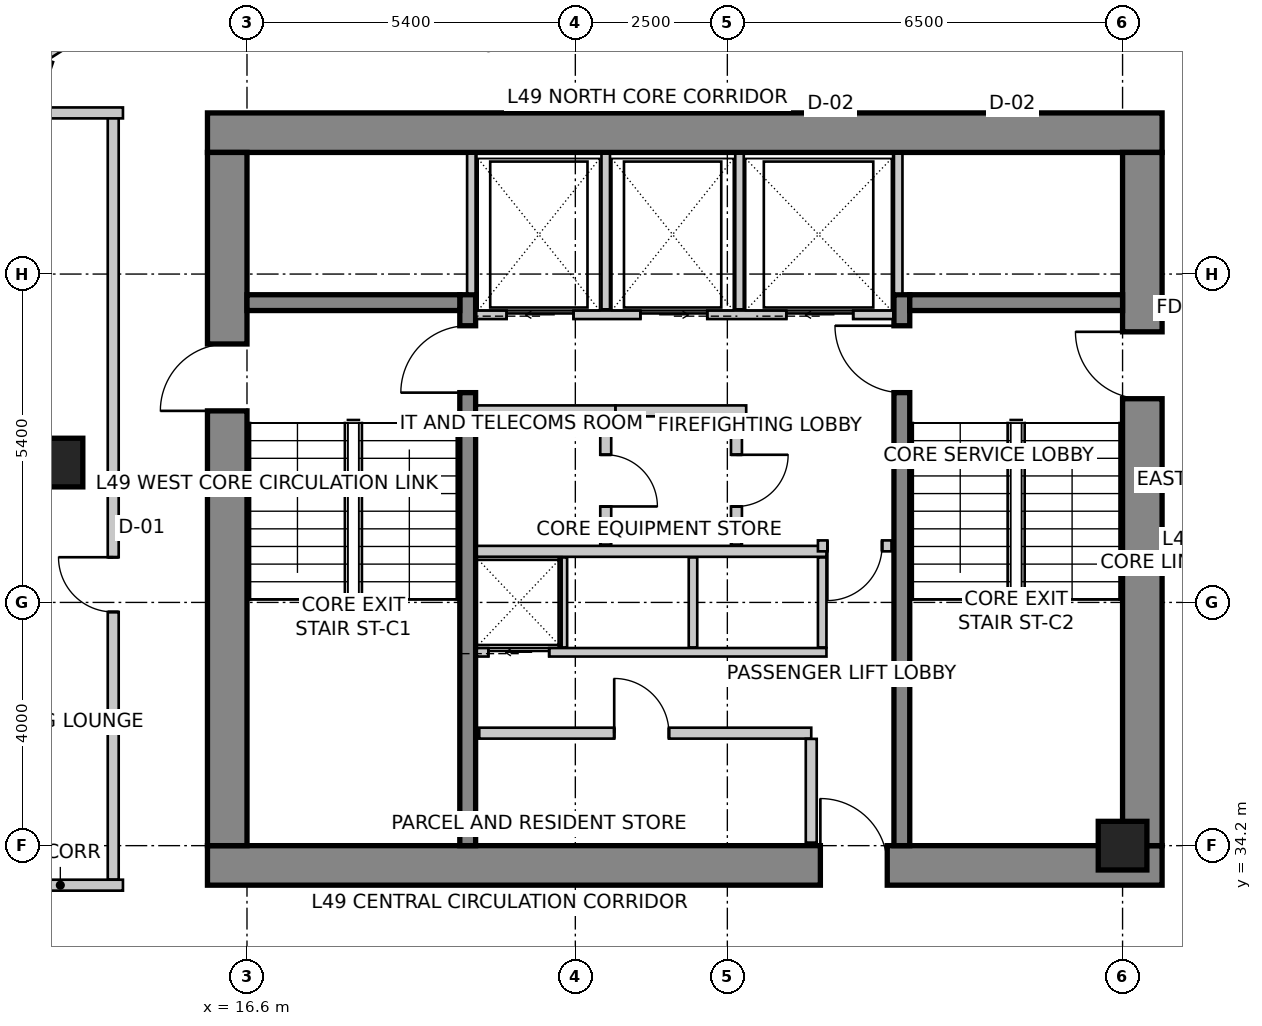
"""IFC4 building model, lengths in metres.
Left out: names, types, materials, properties, quantities, classifications, styles, units other than length and angle.
Written with IfcOpenShell. Run it as: python <this file> out.ifc"""

import sys

from ifc_helpers import new_model, si_unit, direction, frame, frame_2d, origin, origin_2d, place, context, subcontext, project, spatial, rectangle, extrude, source, transform, mapped, element, fill, save


model = new_model("IFC4")
c1 = context("Model", 3, precision=1e-05, world=origin(), true_north=direction((0.0, 1.0)))
c2 = subcontext(c1, "Body", "Model", "MODEL_VIEW")
j1 = project(units=[si_unit("LENGTHUNIT", "METRE"), si_unit("PLANEANGLEUNIT", "RADIAN")], contexts=[c1])
p1 = place(None, origin())
s1 = spatial("IfcSite", under=j1, at=p1, CompositionType="ELEMENT")
p2 = place(p1, origin())
s2 = spatial("IfcBuilding", under=s1, at=p2, CompositionType="ELEMENT")
p3 = place(p2, frame((0.0, 0.0, 197.4)))
s3 = spatial("IfcBuildingStorey", under=s2, at=p3, CompositionType="ELEMENT", Elevation=197.4)
p4 = place(p3, frame((15.95, 45.925, 0.0), z_axis=(0.0, 0.0, 1.0), x_axis=(1.0, 0.0, 0.0)))
e1 = element("IfcWall", 1, at=p4, inside=s3, PredefinedType="SHEAR", context=c2, shape_type="SweptSolid", body=[
    extrude(rectangle(XDim=15.7, YDim=0.65, at=frame_2d((7.85, 0.0))), origin(), (0.0, 0.0, 1.0), 3.5),
])
p5 = place(p3, frame((15.95, 33.875, 0.0), z_axis=(0.0, 0.0, 1.0), x_axis=(1.0, 0.0, 0.0)))
e2 = element("IfcWall", 2, at=p5, inside=s3, PredefinedType="SHEAR", context=c2, shape_type="SweptSolid", body=[
    extrude(rectangle(XDim=15.7, YDim=0.65, at=frame_2d((7.85, 0.0))), origin(), (0.0, 0.0, 1.0), 3.5),
])
m1 = source(origin(), c2, "Body", "SweptSolid", [
    extrude(rectangle(XDim=1.1, YDim=2.15, at=frame_2d((0.55, 1.075))), frame((0.0, 0.335, 0.0), z_axis=(0.0, -1.0, 0.0), x_axis=(1.0, 0.0, 0.0)), (0.0, 0.0, 1.0), 0.67),
])
p6 = place(p5, frame((10.08, 0.0, 0.0)))
e3 = element("IfcOpeningElement", 3, at=p6, cuts=e2, PredefinedType="OPENING", context=c2, shape_type="MappedRepresentation", body=[
    mapped(m1, transform((0.0, 0.0, 0.0), scale=1.0)),
])
p7 = place(p3, frame((16.275, 34.2, 0.0), z_axis=(0.0, 0.0, 1.0), x_axis=(0.0, 1.0, 0.0)))
e4 = element("IfcWall", 4, at=p7, inside=s3, PredefinedType="SHEAR", context=c2, shape_type="SweptSolid", body=[
    extrude(rectangle(XDim=11.4, YDim=0.65, at=frame_2d((5.7, 0.0))), origin(), (0.0, 0.0, 1.0), 3.5),
])
p8 = place(p7, frame((7.15, 0.0, 0.0)))
e5 = element("IfcOpeningElement", 5, at=p8, cuts=e4, PredefinedType="OPENING", context=c2, shape_type="MappedRepresentation", body=[
    mapped(m1, transform((0.0, 0.0, 0.0), scale=1.0)),
])
p9 = place(p3, frame((31.325, 34.2, 0.0), z_axis=(0.0, 0.0, 1.0), x_axis=(0.0, 1.0, 0.0)))
e6 = element("IfcWall", 6, at=p9, inside=s3, PredefinedType="SHEAR", context=c2, shape_type="SweptSolid", body=[
    extrude(rectangle(XDim=11.4, YDim=0.65, at=frame_2d((5.7, 0.0))), origin(), (0.0, 0.0, 1.0), 3.5),
])
p10 = place(p9, frame((7.35, 0.0, 0.0)))
e7 = element("IfcOpeningElement", 7, at=p10, cuts=e6, PredefinedType="OPENING", context=c2, shape_type="MappedRepresentation", body=[
    mapped(m1, transform((0.0, 0.0, 0.0), scale=1.0)),
])
p11 = place(p3, frame((20.23, 34.2, 0.0), z_axis=(0.0, 0.0, 1.0), x_axis=(0.0, 1.0, 0.0)))
e8 = element("IfcWall", 8, at=p11, inside=s3, PredefinedType="SHEAR", context=c2, shape_type="SweptSolid", body=[
    extrude(rectangle(XDim=9.06, YDim=0.26, at=frame_2d((4.53, 0.0))), origin(), (0.0, 0.0, 1.0), 3.5),
])
m2 = source(origin(), c2, "Body", "SweptSolid", [
    extrude(rectangle(XDim=1.1, YDim=2.15, at=frame_2d((0.55, 1.075))), frame((0.0, 0.14, 0.0), z_axis=(0.0, -1.0, 0.0), x_axis=(1.0, 0.0, 0.0)), (0.0, 0.0, 1.0), 0.28),
])
p12 = place(p11, frame((7.45, 0.0, 0.0)))
e9 = element("IfcOpeningElement", 9, at=p12, cuts=e8, PredefinedType="OPENING", context=c2, shape_type="MappedRepresentation", body=[
    mapped(m2, transform((0.0, 0.0, 0.0), scale=1.0)),
])
p13 = place(p3, frame((27.37, 34.2, 0.0), z_axis=(0.0, 0.0, 1.0), x_axis=(0.0, 1.0, 0.0)))
e10 = element("IfcWall", 10, at=p13, inside=s3, PredefinedType="SHEAR", context=c2, shape_type="SweptSolid", body=[
    extrude(rectangle(XDim=9.06, YDim=0.26, at=frame_2d((4.53, 0.0))), origin(), (0.0, 0.0, 1.0), 3.5),
])
p14 = place(p13, frame((7.45, 0.0, 0.0)))
e11 = element("IfcOpeningElement", 11, at=p14, cuts=e10, PredefinedType="OPENING", context=c2, shape_type="MappedRepresentation", body=[
    mapped(m2, transform((0.0, 0.0, 0.0), scale=1.0)),
])
for number, where, z_axis, x_axis in (
    (12, (16.6, 43.13, 0.0), (0.0, 0.0, 1.0), (1.0, 0.0, 0.0)),
    (13, (27.5, 43.13, 0.0), (0.0, 0.0, 1.0), (1.0, 0.0, 0.0)),
):
    element("IfcWall", number, at=place(p3, frame(where, z_axis=z_axis, x_axis=x_axis)), inside=s3, PredefinedType="SHEAR", context=c2, shape_type="SweptSolid", body=[
        extrude(rectangle(XDim=3.5, YDim=0.26, at=frame_2d((1.75, 0.0))), origin(), (0.0, 0.0, 1.0), 3.5),
    ])
m3 = source(origin(), c2, "Body", "SweptSolid", [
    extrude(rectangle(XDim=0.8, YDim=0.8, at=origin_2d()), origin(), (0.0, 0.0, 1.0), 3.5),
])
for number, where, z_axis, x_axis in (
    (14, (13.5, 40.5, 0.0), (0.0, 0.0, 1.0), (1.0, 0.0, 0.0)),
    (15, (31.0, 34.2, 0.0), (0.0, 0.0, 1.0), (1.0, 0.0, 0.0)),
):
    element("IfcColumn", number, at=place(p3, frame(where, z_axis=z_axis, x_axis=x_axis)), inside=s3, PredefinedType="COLUMN", context=c2, shape_type="MappedRepresentation", body=[
        mapped(m3, transform((0.0, 0.0, 0.0), scale=1.0)),
    ])
p15 = place(p3, frame((21.875, 52.742, 0.0), z_axis=(0.0, 0.0, 1.0), x_axis=(-0.843666375448, -0.536867811419, 0.0)))
e16 = element("IfcWall", 16, at=p15, inside=s3, PredefinedType="SOLIDWALL", context=c2, shape_type="SweptSolid", body=[
    extrude(rectangle(XDim=10.284, YDim=0.3, at=frame_2d((5.142, 0.0))), origin(), (0.0, 0.0, 1.0), 3.25),
])
m4 = source(origin(), c2, "Body", "SweptSolid", [
    extrude(rectangle(XDim=2.4, YDim=2.2, at=frame_2d((1.2, 1.1))), frame((0.0, 0.16, 0.0), z_axis=(0.0, -1.0, 0.0), x_axis=(1.0, 0.0, 0.0)), (0.0, 0.0, 1.0), 0.32),
])
p16 = place(p15, frame((3.307, 0.0, 0.85)))
e17 = element("IfcOpeningElement", 17, at=p16, cuts=e16, PredefinedType="OPENING", context=c2, shape_type="MappedRepresentation", body=[
    mapped(m4, transform((0.0, 0.0, 0.0), scale=1.0)),
])
p17 = place(p3, frame((13.269, 47.134, 0.0), z_axis=(0.0, 0.0, 1.0), x_axis=(-0.319920776449, -0.947444297464, 0.0)))
e18 = element("IfcWall", 18, at=p17, inside=s3, PredefinedType="SOLIDWALL", context=c2, shape_type="SweptSolid", body=[
    extrude(rectangle(XDim=16.133, YDim=0.3, at=frame_2d((8.067, 0.0))), origin(), (0.0, 0.0, 1.0), 3.25),
])
m5 = source(origin(), c2, "Body", "SweptSolid", [
    extrude(rectangle(XDim=2.1, YDim=2.0, at=frame_2d((1.05, 1.0))), frame((0.0, 0.16, 0.0), z_axis=(0.0, -1.0, 0.0), x_axis=(1.0, 0.0, 0.0)), (0.0, 0.0, 1.0), 0.32),
])
p18 = place(p17, frame((2.513, 0.0, 0.85)))
e19 = element("IfcOpeningElement", 19, at=p18, cuts=e18, PredefinedType="OPENING", context=c2, shape_type="MappedRepresentation", body=[
    mapped(m5, transform((0.0, 0.0, 0.0), scale=1.0)),
])
p19 = place(p17, frame((7.26, 0.0, 0.85)))
e20 = element("IfcOpeningElement", 20, at=p19, cuts=e18, PredefinedType="OPENING", context=c2, shape_type="MappedRepresentation", body=[
    mapped(m4, transform((0.0, 0.0, 0.0), scale=1.0)),
])
p20 = place(p17, frame((12.307, 0.0, 0.85)))
e21 = element("IfcOpeningElement", 21, at=p20, cuts=e18, PredefinedType="OPENING", context=c2, shape_type="MappedRepresentation", body=[
    mapped(m5, transform((0.0, 0.0, 0.0), scale=1.0)),
])
p21 = place(p3, frame((20.37, 42.93, 0.0), z_axis=(0.0, 0.0, 1.0), x_axis=(1.0, 0.0, 0.0)))
e22 = element("IfcWall", 22, at=p21, inside=s3, PredefinedType="SOLIDWALL", context=c2, shape_type="SweptSolid", body=[
    extrude(rectangle(XDim=6.86, YDim=0.14, at=frame_2d((3.43, 0.0))), origin(), (0.0, 0.0, 1.0), 3.25),
])
m6 = source(origin(), c2, "Body", "SweptSolid", [
    extrude(rectangle(XDim=1.1, YDim=2.15, at=frame_2d((0.55, 1.075))), frame((0.0, 0.08, 0.0), z_axis=(0.0, -1.0, 0.0), x_axis=(1.0, 0.0, 0.0)), (0.0, 0.0, 1.0), 0.16),
])
p22 = place(p21, frame((0.5, 0.0, 0.0)))
e23 = element("IfcOpeningElement", 23, at=p22, cuts=e22, PredefinedType="OPENING", context=c2, shape_type="MappedRepresentation", body=[
    mapped(m6, transform((0.0, 0.0, 0.0), scale=1.0)),
])
p23 = place(p21, frame((2.7, 0.0, 0.0)))
e24 = element("IfcOpeningElement", 24, at=p23, cuts=e22, PredefinedType="OPENING", context=c2, shape_type="MappedRepresentation", body=[
    mapped(m6, transform((0.0, 0.0, 0.0), scale=1.0)),
])
p24 = place(p21, frame((5.1, 0.0, 0.0)))
e25 = element("IfcOpeningElement", 25, at=p24, cuts=e22, PredefinedType="OPENING", context=c2, shape_type="MappedRepresentation", body=[
    mapped(m6, transform((0.0, 0.0, 0.0), scale=1.0)),
])
for number, where, z_axis, x_axis in (
    (26, (20.29, 43.28, 0.0), (0.0, 0.0, 1.0), (0.0, 1.0, 0.0)),
    (27, (27.31, 43.28, 0.0), (0.0, 0.0, 1.0), (0.0, 1.0, 0.0)),
):
    element("IfcWall", number, at=place(p3, frame(where, z_axis=z_axis, x_axis=x_axis)), inside=s3, PredefinedType="SOLIDWALL", context=c2, shape_type="SweptSolid", body=[
        extrude(rectangle(XDim=2.3, YDim=0.14, at=frame_2d((1.15, 0.0))), origin(), (0.0, 0.0, 1.0), 3.25),
    ])
for number, where, z_axis, x_axis in (
    (28, (22.5, 43.02, 0.0), (0.0, 0.0, 1.0), (0.0, 1.0, 0.0)),
    (29, (24.7, 43.02, 0.0), (0.0, 0.0, 1.0), (0.0, 1.0, 0.0)),
):
    element("IfcWall", number, at=place(p3, frame(where, z_axis=z_axis, x_axis=x_axis)), inside=s3, PredefinedType="SOLIDWALL", context=c2, shape_type="SweptSolid", body=[
        extrude(rectangle(XDim=2.56, YDim=0.14, at=frame_2d((1.28, 0.0))), origin(), (0.0, 0.0, 1.0), 3.25),
    ])
p25 = place(p3, frame((20.38, 37.38, 0.0), z_axis=(0.0, 0.0, 1.0), x_axis=(1.0, 0.0, 0.0)))
e30 = element("IfcWall", 30, at=p25, inside=s3, PredefinedType="SOLIDWALL", context=c2, shape_type="SweptSolid", body=[
    extrude(rectangle(XDim=5.75, YDim=0.14, at=frame_2d((2.875, 0.0))), origin(), (0.0, 0.0, 1.0), 3.25),
])
m7 = source(origin(), c2, "Body", "SweptSolid", [
    extrude(rectangle(XDim=1.0, YDim=2.15, at=frame_2d((0.5, 1.075))), frame((0.0, 0.08, 0.0), z_axis=(0.0, -1.0, 0.0), x_axis=(1.0, 0.0, 0.0)), (0.0, 0.0, 1.0), 0.16),
])
p26 = place(p25, frame((0.19, 0.0, 0.0)))
e31 = element("IfcOpeningElement", 31, at=p26, cuts=e30, PredefinedType="OPENING", context=c2, shape_type="MappedRepresentation", body=[
    mapped(m7, transform((0.0, 0.0, 0.0), scale=1.0)),
])
p27 = place(p3, frame((20.38, 39.04, 0.0), z_axis=(0.0, 0.0, 1.0), x_axis=(1.0, 0.0, 0.0)))
e32 = element("IfcWall", 32, at=p27, inside=s3, PredefinedType="SOLIDWALL", context=c2, shape_type="SweptSolid", body=[
    extrude(rectangle(XDim=5.75, YDim=0.18, at=frame_2d((2.875, 0.0))), origin(), (0.0, 0.0, 1.0), 3.25),
])
for number, where, z_axis, x_axis in (
    (33, (26.06, 37.46, 0.0), (0.0, 0.0, 1.0), (0.0, 1.0, 0.0)),
    (34, (21.795, 37.46, 0.0), (0.0, 0.0, 1.0), (0.0, 1.0, 0.0)),
    (35, (23.935, 37.46, 0.0), (0.0, 0.0, 1.0), (0.0, 1.0, 0.0)),
):
    element("IfcWall", number, at=place(p3, frame(where, z_axis=z_axis, x_axis=x_axis)), inside=s3, PredefinedType="SOLIDWALL", context=c2, shape_type="SweptSolid", body=[
        extrude(rectangle(XDim=1.48, YDim=0.14, at=frame_2d((0.74, 0.0))), origin(), (0.0, 0.0, 1.0), 3.25),
    ])
p28 = place(p3, frame((22.66, 41.35, 0.0), z_axis=(0.0, 0.0, 1.0), x_axis=(-1.0, 0.0, 0.0)))
e36 = element("IfcWall", 36, at=p28, inside=s3, PredefinedType="PARTITIONING", context=c2, shape_type="SweptSolid", body=[
    extrude(rectangle(XDim=2.28, YDim=0.18, at=frame_2d((1.14, 0.0))), origin(), (0.0, 0.0, 1.0), 3.25),
])
p29 = place(p3, frame((24.81, 41.35, 0.0), z_axis=(0.0, 0.0, 1.0), x_axis=(-1.0, 0.0, 0.0)))
e37 = element("IfcWall", 37, at=p29, inside=s3, PredefinedType="PARTITIONING", context=c2, shape_type="SweptSolid", body=[
    extrude(rectangle(XDim=2.148, YDim=0.18, at=frame_2d((1.074, 0.0))), origin(), (0.0, 0.0, 1.0), 3.25),
])
p30 = place(p3, frame((22.5, 41.256, 0.0), z_axis=(0.0, 0.0, 1.0), x_axis=(0.0, -1.0, 0.0)))
e38 = element("IfcWall", 38, at=p30, inside=s3, PredefinedType="PARTITIONING", context=c2, shape_type="SweptSolid", body=[
    extrude(rectangle(XDim=2.106, YDim=0.18, at=frame_2d((1.053, 0.0))), origin(), (0.0, 0.0, 1.0), 3.25),
])
m8 = source(origin(), c2, "Body", "SweptSolid", [
    extrude(rectangle(XDim=0.85, YDim=2.15, at=frame_2d((0.425, 1.075))), frame((0.0, 0.1, 0.0), z_axis=(0.0, -1.0, 0.0), x_axis=(1.0, 0.0, 0.0)), (0.0, 0.0, 1.0), 0.2),
])
p31 = place(p30, frame((0.628, 0.0, 0.0)))
e39 = element("IfcOpeningElement", 39, at=p31, cuts=e38, PredefinedType="OPENING", context=c2, shape_type="MappedRepresentation", body=[
    mapped(m8, transform((0.0, 0.0, 0.0), scale=1.0)),
])
p32 = place(p3, frame((24.65, 41.256, 0.0), z_axis=(0.0, 0.0, 1.0), x_axis=(0.0, -1.0, 0.0)))
e40 = element("IfcWall", 40, at=p32, inside=s3, PredefinedType="PARTITIONING", context=c2, shape_type="SweptSolid", body=[
    extrude(rectangle(XDim=2.106, YDim=0.18, at=frame_2d((1.053, 0.0))), origin(), (0.0, 0.0, 1.0), 3.25),
])
p33 = place(p32, frame((0.628, 0.0, 0.0)))
e41 = element("IfcOpeningElement", 41, at=p33, cuts=e40, PredefinedType="OPENING", context=c2, shape_type="MappedRepresentation", body=[
    mapped(m8, transform((0.0, 0.0, 0.0), scale=1.0)),
])
p34 = place(p3, frame((27.2, 39.13, 0.0), z_axis=(0.0, 0.0, 1.0), x_axis=(-1.0, 0.0, 0.0)))
e42 = element("IfcWall", 42, at=p34, inside=s3, PredefinedType="PARTITIONING", context=c2, shape_type="SweptSolid", body=[
    extrude(rectangle(XDim=1.21, YDim=0.18, at=frame_2d((0.605, 0.0))), origin(), (0.0, 0.0, 1.0), 3.25),
])
m9 = source(origin(), c2, "Body", "SweptSolid", [
    extrude(rectangle(XDim=0.9, YDim=2.15, at=frame_2d((0.45, 1.075))), frame((0.0, 0.1, 0.0), z_axis=(0.0, -1.0, 0.0), x_axis=(1.0, 0.0, 0.0)), (0.0, 0.0, 1.0), 0.2),
])
p35 = place(p34, frame((0.155, 0.0, 0.0)))
e43 = element("IfcOpeningElement", 43, at=p35, cuts=e42, PredefinedType="OPENING", context=c2, shape_type="MappedRepresentation", body=[
    mapped(m9, transform((0.0, 0.0, 0.0), scale=1.0)),
])
p36 = place(p3, frame((20.42, 36.05, 0.0), z_axis=(0.0, 0.0, 1.0), x_axis=(1.0, 0.0, 0.0)))
e44 = element("IfcWall", 44, at=p36, inside=s3, PredefinedType="PARTITIONING", context=c2, shape_type="SweptSolid", body=[
    extrude(rectangle(XDim=5.46, YDim=0.18, at=frame_2d((2.73, 0.0))), origin(), (0.0, 0.0, 1.0), 3.25),
])
p37 = place(p36, frame((2.219, 0.0, 0.0)))
e45 = element("IfcOpeningElement", 45, at=p37, cuts=e44, PredefinedType="OPENING", context=c2, shape_type="MappedRepresentation", body=[
    mapped(m9, transform((0.0, 0.0, 0.0), scale=1.0)),
])
p38 = place(p3, frame((25.88, 35.956, 0.0), z_axis=(0.0, 0.0, 1.0), x_axis=(0.0, -1.0, 0.0)))
e46 = element("IfcWall", 46, at=p38, inside=s3, PredefinedType="PARTITIONING", context=c2, shape_type="SweptSolid", body=[
    extrude(rectangle(XDim=1.706, YDim=0.18, at=frame_2d((0.853, 0.0))), origin(), (0.0, 0.0, 1.0), 2.542),
])
p39 = place(p3, frame((12.5, 33.55, 0.0), z_axis=(0.0, 0.0, 1.0), x_axis=(1.0, 0.0, 0.0)))
e47 = element("IfcWall", 47, at=p39, inside=s3, PredefinedType="PARTITIONING", context=c2, shape_type="SweptSolid", body=[
    extrude(rectangle(XDim=2.06, YDim=0.18, at=frame_2d((1.03, 0.0))), origin(), (0.0, 0.0, 1.0), 3.25),
])
p40 = place(p3, frame((14.4, 33.644, 0.0), z_axis=(0.0, 0.0, 1.0), x_axis=(0.0, 1.0, 0.0)))
e48 = element("IfcWall", 48, at=p40, inside=s3, PredefinedType="PARTITIONING", context=c2, shape_type="SweptSolid", body=[
    extrude(rectangle(XDim=12.606, YDim=0.18, at=frame_2d((6.303, 0.0))), origin(), (0.0, 0.0, 1.0), 3.25),
])
p41 = place(p40, frame((4.399, 0.0, 0.0)))
e49 = element("IfcOpeningElement", 49, at=p41, cuts=e48, PredefinedType="OPENING", context=c2, shape_type="MappedRepresentation", body=[
    mapped(m9, transform((0.0, 0.0, 0.0), scale=1.0)),
])
p42 = place(p3, frame((14.56, 46.25, 0.0), z_axis=(0.0, 0.0, 1.0), x_axis=(-1.0, 0.0, 0.0)))
e50 = element("IfcWall", 50, at=p42, inside=s3, PredefinedType="PARTITIONING", context=c2, shape_type="SweptSolid", body=[
    extrude(rectangle(XDim=1.469, YDim=0.18, at=frame_2d((0.734, 0.0))), origin(), (0.0, 0.0, 1.0), 3.25),
])
m10 = source(origin(), c2, "Body", "SweptSolid", [
    extrude(rectangle(XDim=1.1, YDim=2.15, at=frame_2d((0.55, 1.075))), frame((0.0, 0.025, 0.0), z_axis=(0.0, -1.0, 0.0), x_axis=(1.0, 0.0, 0.0)), (0.0, 0.0, 1.0), 0.05),
])
p43 = place(p22, origin())
e51 = element("IfcDoor", 51, at=p43, inside=s3, OperationType="SLIDING_TO_LEFT", PredefinedType="DOOR", context=c2, shape_type="MappedRepresentation", body=[
    mapped(m10, transform((0.0, 0.0, 0.0), scale=1.0)),
])
fill(e23, e51)
p44 = place(p23, origin())
e52 = element("IfcDoor", 52, at=p44, inside=s3, OperationType="SLIDING_TO_RIGHT", PredefinedType="DOOR", context=c2, shape_type="MappedRepresentation", body=[
    mapped(m10, transform((0.0, 0.0, 0.0), scale=1.0)),
])
fill(e24, e52)
m11 = source(origin(), c2, "Body", "SweptSolid", [
    extrude(rectangle(XDim=1.1, YDim=2.15, at=frame_2d((0.55, 1.075))), frame((0.0, 0.025, 0.0), z_axis=(0.0, -1.0, 0.0), x_axis=(1.0, 0.0, 0.0)), (0.0, 0.0, 1.0), 0.05),
])
p45 = place(p24, origin())
e53 = element("IfcDoor", 53, at=p45, inside=s3, OperationType="SLIDING_TO_LEFT", PredefinedType="DOOR", context=c2, shape_type="MappedRepresentation", body=[
    mapped(m11, transform((0.0, 0.0, 0.0), scale=1.0)),
])
fill(e25, e53)
m12 = source(origin(), c2, "Body", "SweptSolid", [
    extrude(rectangle(XDim=1.0, YDim=2.15, at=frame_2d((0.5, 1.075))), frame((0.0, 0.025, 0.0), z_axis=(0.0, -1.0, 0.0), x_axis=(1.0, 0.0, 0.0)), (0.0, 0.0, 1.0), 0.05),
])
p46 = place(p26, origin())
e54 = element("IfcDoor", 54, at=p46, inside=s3, OperationType="SLIDING_TO_LEFT", PredefinedType="DOOR", context=c2, shape_type="MappedRepresentation", body=[
    mapped(m12, transform((0.0, 0.0, 0.0), scale=1.0)),
])
fill(e31, e54)
m13 = source(origin(), c2, "Body", "SweptSolid", [
    extrude(rectangle(XDim=1.1, YDim=2.15, at=frame_2d((0.55, 1.075))), frame((0.0, 0.025, 0.0), z_axis=(0.0, -1.0, 0.0), x_axis=(1.0, 0.0, 0.0)), (0.0, 0.0, 1.0), 0.05),
])
p47 = place(p12, origin())
e55 = element("IfcDoor", 55, at=p47, inside=s3, OperationType="SINGLE_SWING_LEFT", PredefinedType="DOOR", context=c2, shape_type="MappedRepresentation", body=[
    mapped(m13, transform((0.0, 0.0, 0.0), scale=1.0)),
])
fill(e9, e55)
p48 = place(p14, origin())
e56 = element("IfcDoor", 56, at=p48, inside=s3, OperationType="SINGLE_SWING_RIGHT", PredefinedType="DOOR", context=c2, shape_type="MappedRepresentation", body=[
    mapped(m13, transform((0.0, 0.0, 0.0), scale=1.0)),
])
fill(e11, e56)
p49 = place(p8, origin())
e57 = element("IfcDoor", 57, at=p49, inside=s3, OperationType="SINGLE_SWING_LEFT", PredefinedType="DOOR", context=c2, shape_type="MappedRepresentation", body=[
    mapped(m13, transform((0.0, 0.0, 0.0), scale=1.0)),
])
fill(e5, e57)
p50 = place(p10, origin())
e58 = element("IfcDoor", 58, at=p50, inside=s3, OperationType="SINGLE_SWING_RIGHT", PredefinedType="DOOR", context=c2, shape_type="MappedRepresentation", body=[
    mapped(m13, transform((0.0, 0.0, 0.0), scale=1.0)),
])
fill(e7, e58)
p51 = place(p6, origin())
e59 = element("IfcDoor", 59, at=p51, inside=s3, OperationType="SINGLE_SWING_LEFT", PredefinedType="DOOR", context=c2, shape_type="MappedRepresentation", body=[
    mapped(m13, transform((0.0, 0.0, 0.0), scale=1.0)),
])
fill(e3, e59)
m14 = source(origin(), c2, "Body", "SweptSolid", [
    extrude(rectangle(XDim=0.85, YDim=2.15, at=frame_2d((0.425, 1.075))), frame((0.0, 0.025, 0.0), z_axis=(0.0, -1.0, 0.0), x_axis=(1.0, 0.0, 0.0)), (0.0, 0.0, 1.0), 0.05),
])
p52 = place(p31, origin())
e60 = element("IfcDoor", 60, at=p52, inside=s3, OperationType="SINGLE_SWING_RIGHT", PredefinedType="DOOR", context=c2, shape_type="MappedRepresentation", body=[
    mapped(m14, transform((0.0, 0.0, 0.0), scale=1.0)),
])
fill(e39, e60)
p53 = place(p33, origin())
e61 = element("IfcDoor", 61, at=p53, inside=s3, OperationType="SINGLE_SWING_LEFT", PredefinedType="DOOR", context=c2, shape_type="MappedRepresentation", body=[
    mapped(m14, transform((0.0, 0.0, 0.0), scale=1.0)),
])
fill(e41, e61)
m15 = source(origin(), c2, "Body", "SweptSolid", [
    extrude(rectangle(XDim=0.9, YDim=2.15, at=frame_2d((0.45, 1.075))), frame((0.0, 0.025, 0.0), z_axis=(0.0, -1.0, 0.0), x_axis=(1.0, 0.0, 0.0)), (0.0, 0.0, 1.0), 0.05),
])
p54 = place(p35, origin())
e62 = element("IfcDoor", 62, at=p54, inside=s3, OperationType="SINGLE_SWING_RIGHT", PredefinedType="DOOR", context=c2, shape_type="MappedRepresentation", body=[
    mapped(m15, transform((0.0, 0.0, 0.0), scale=1.0)),
])
fill(e43, e62)
p55 = place(p37, origin())
e63 = element("IfcDoor", 63, at=p55, inside=s3, OperationType="SINGLE_SWING_LEFT", PredefinedType="DOOR", context=c2, shape_type="MappedRepresentation", body=[
    mapped(m15, transform((0.0, 0.0, 0.0), scale=1.0)),
])
fill(e45, e63)
m16 = source(origin(), c2, "Body", "SweptSolid", [
    extrude(rectangle(XDim=0.9, YDim=2.15, at=frame_2d((0.45, 1.075))), frame((0.0, 0.025, 0.0), z_axis=(0.0, -1.0, 0.0), x_axis=(1.0, 0.0, 0.0)), (0.0, 0.0, 1.0), 0.05),
])
p56 = place(p41, origin())
e64 = element("IfcDoor", 64, at=p56, inside=s3, OperationType="SINGLE_SWING_RIGHT", PredefinedType="DOOR", context=c2, shape_type="MappedRepresentation", body=[
    mapped(m16, transform((0.0, 0.0, 0.0), scale=1.0)),
])
fill(e49, e64)
save(model, sys.argv[1])
